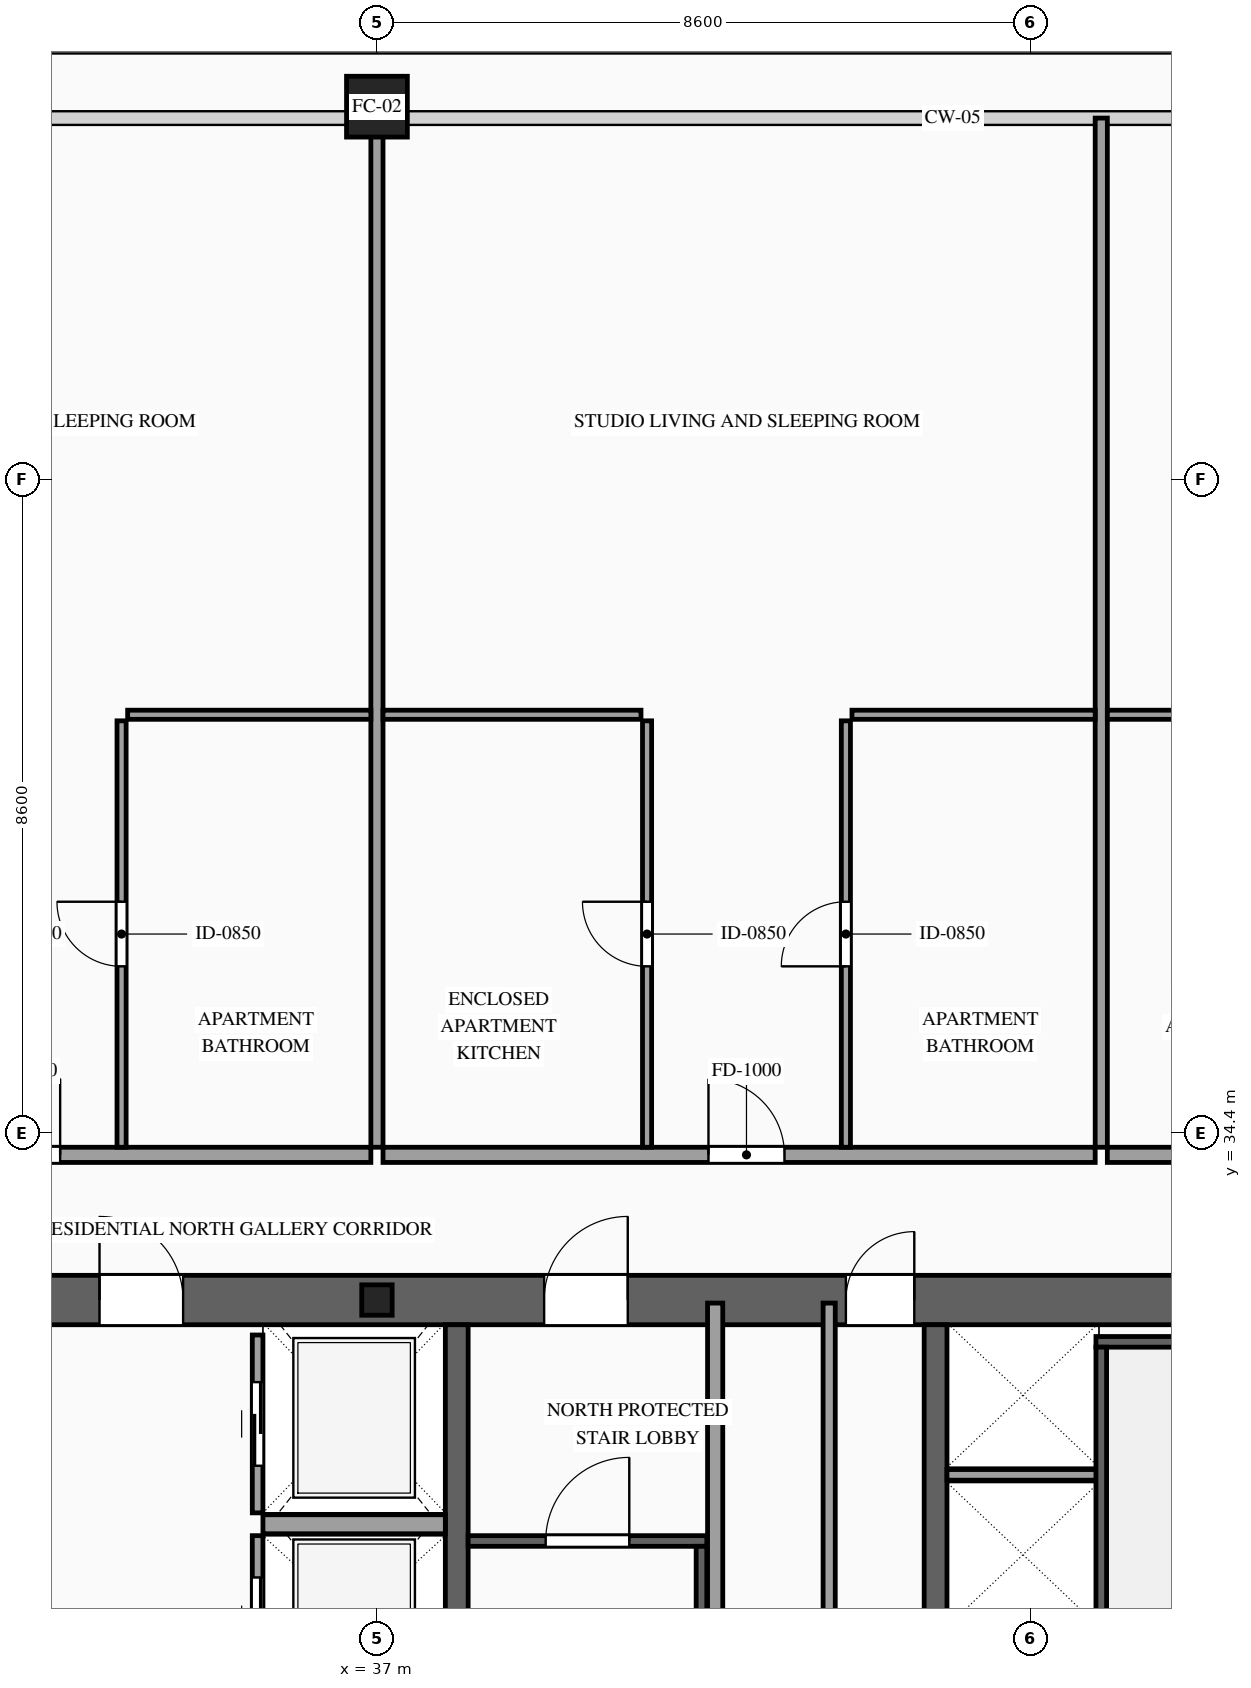
"""IFC4 building model, lengths in metres.
Left out: names, types, materials, properties, quantities, classifications, styles, units other than length and angle.
Written with IfcOpenShell. Run it as: python <this file> out.ifc"""

import sys

from ifc_helpers import new_model, si_unit, direction, frame, frame_2d, origin, origin_2d, place, context, subcontext, project, spatial, rectangle, hollow_rectangle, i_section, extrude, source, transform, mapped, element, fill, save


model = new_model("IFC4")
c1 = context("Model", 3, precision=1e-05, world=origin(), true_north=direction((0.0, 1.0)))
c2 = subcontext(c1, "Body", "Model", "MODEL_VIEW")
j1 = project(units=[si_unit("LENGTHUNIT", "METRE"), si_unit("PLANEANGLEUNIT", "RADIAN")], contexts=[c1])
p1 = place(None, origin())
s1 = spatial("IfcSite", under=j1, at=p1, CompositionType="ELEMENT")
p2 = place(p1, origin())
s2 = spatial("IfcBuilding", under=s1, at=p2, CompositionType="ELEMENT")
p3 = place(p2, frame((0.0, 0.0, 184.5)))
s3 = spatial("IfcBuildingStorey", under=s2, at=p3, CompositionType="ELEMENT", Elevation=184.5)
p4 = place(p3, frame((23.475, 32.2, 0.0), z_axis=(0.0, 0.0, 1.0), x_axis=(1.0, 0.0, 0.0)))
e1 = element("IfcWall", 1, at=p4, inside=s3, PredefinedType="SHEAR", context=c2, shape_type="SweptSolid", body=[
    extrude(rectangle(XDim=27.05, YDim=0.65, at=frame_2d((13.525, 0.0))), origin(), (0.0, 0.0, 1.0), 3.5),
])
p5 = place(p4, frame((4.595, 0.0, 0.0)))
e2 = element("IfcOpeningElement", 2, at=p5, cuts=e1, PredefinedType="OPENING", context=c2, shape_type="SweptSolid", body=[
    extrude(rectangle(XDim=0.9, YDim=2.15, at=frame_2d((0.45, 1.075))), frame((0.0, 0.34, 0.0), z_axis=(0.0, -1.0, 0.0), x_axis=(1.0, 0.0, 0.0)), (0.0, 0.0, 1.0), 0.68),
])
p6 = place(p4, frame((9.875, 0.0, 0.0)))
e3 = element("IfcOpeningElement", 3, at=p6, cuts=e1, PredefinedType="OPENING", context=c2, shape_type="SweptSolid", body=[
    extrude(rectangle(XDim=1.1, YDim=2.2, at=frame_2d((0.55, 1.1))), frame((0.0, 0.34, 0.0), z_axis=(0.0, -1.0, 0.0), x_axis=(1.0, 0.0, 0.0)), (0.0, 0.0, 1.0), 0.68),
])
p7 = place(p4, frame((15.725, 0.0, 0.0)))
e4 = element("IfcOpeningElement", 4, at=p7, cuts=e1, PredefinedType="OPENING", context=c2, shape_type="SweptSolid", body=[
    extrude(rectangle(XDim=1.1, YDim=2.2, at=frame_2d((0.55, 1.1))), frame((0.0, 0.34, 0.0), z_axis=(0.0, -1.0, 0.0), x_axis=(1.0, 0.0, 0.0)), (0.0, 0.0, 1.0), 0.68),
])
p8 = place(p4, frame((19.695, 0.0, 0.0)))
e5 = element("IfcOpeningElement", 5, at=p8, cuts=e1, PredefinedType="OPENING", context=c2, shape_type="SweptSolid", body=[
    extrude(rectangle(XDim=0.9, YDim=2.15, at=frame_2d((0.45, 1.075))), frame((0.0, 0.34, 0.0), z_axis=(0.0, -1.0, 0.0), x_axis=(1.0, 0.0, 0.0)), (0.0, 0.0, 1.0), 0.68),
])
m1 = source(origin(), c2, "Body", "SweptSolid", [
    extrude(rectangle(XDim=12.15, YDim=0.3, at=frame_2d((6.075, 0.0))), origin(), (0.0, 0.0, 1.0), 3.5),
])
for number, where, z_axis, x_axis in (
    (6, (38.05, 19.725, 0.0), (0.0, 0.0, 1.0), (0.0, 1.0, 0.0)),
    (7, (44.35, 19.725, 0.0), (0.0, 0.0, 1.0), (0.0, 1.0, 0.0)),
):
    element("IfcWall", number, at=place(p3, frame(where, z_axis=z_axis, x_axis=x_axis)), inside=s3, PredefinedType="SOLIDWALL", context=c2, shape_type="MappedRepresentation", body=[
        mapped(m1, transform((0.0, 0.0, 0.0), scale=1.0)),
    ])
m2 = source(origin(), c2, "Body", "SweptSolid", [
    extrude(i_section(OverallWidth=0.4, OverallDepth=0.4, WebThickness=0.013, FlangeThickness=0.021, at=origin_2d()), origin(), (0.0, 0.0, 1.0), 3.5),
])
p9 = place(p3, frame((37.0, 32.2, 0.0), z_axis=(0.0, 0.0, 1.0), x_axis=(1.0, 0.0, 0.0)))
e8 = element("IfcColumn", 8, at=p9, inside=s3, PredefinedType="COLUMN", context=c2, shape_type="MappedRepresentation", body=[
    mapped(m2, transform((0.0, 0.0, 0.0), scale=1.0)),
])
m3 = source(origin(), c2, "Body", "SweptSolid", [
    extrude(hollow_rectangle(XDim=0.8, YDim=0.8, WallThickness=0.036, at=origin_2d()), origin(), (0.0, 0.0, 1.0), 3.5),
])
p10 = place(p3, frame((37.0, 47.9, 0.0), z_axis=(0.0, 0.0, 1.0), x_axis=(1.0, 0.0, 0.0)))
e9 = element("IfcColumn", 9, at=p10, inside=s3, PredefinedType="COLUMN", context=c2, shape_type="MappedRepresentation", body=[
    mapped(m3, transform((0.0, 0.0, 0.0), scale=1.0)),
])
p11 = place(p3, frame((35.43, 26.9, 0.0), z_axis=(0.0, 0.0, 1.0), x_axis=(0.0, 1.0, 0.0)))
e10 = element("IfcWall", 10, at=p11, inside=s3, PredefinedType="SOLIDWALL", context=c2, shape_type="SweptSolid", body=[
    extrude(rectangle(XDim=2.2, YDim=0.14, at=frame_2d((1.1, 0.0))), origin(), (0.0, 0.0, 1.0), 3.28),
])
p12 = place(p11, frame((0.55, 0.0, 0.0)))
e11 = element("IfcOpeningElement", 11, at=p12, cuts=e10, PredefinedType="OPENING", context=c2, shape_type="SweptSolid", body=[
    extrude(rectangle(XDim=1.1, YDim=2.2, at=frame_2d((0.55, 1.1))), frame((0.0, 0.085, 0.0), z_axis=(0.0, -1.0, 0.0), x_axis=(1.0, 0.0, 0.0)), (0.0, 0.0, 1.0), 0.17),
])
p13 = place(p3, frame((35.43, 29.4, 0.0), z_axis=(0.0, 0.0, 1.0), x_axis=(0.0, 1.0, 0.0)))
e12 = element("IfcWall", 12, at=p13, inside=s3, PredefinedType="SOLIDWALL", context=c2, shape_type="SweptSolid", body=[
    extrude(rectangle(XDim=2.34, YDim=0.14, at=frame_2d((1.17, 0.0))), origin(), (0.0, 0.0, 1.0), 3.28),
])
p14 = place(p13, frame((0.62, 0.0, 0.0)))
e13 = element("IfcOpeningElement", 13, at=p14, cuts=e12, PredefinedType="OPENING", context=c2, shape_type="SweptSolid", body=[
    extrude(rectangle(XDim=1.1, YDim=2.2, at=frame_2d((0.55, 1.1))), frame((0.0, 0.085, 0.0), z_axis=(0.0, -1.0, 0.0), x_axis=(1.0, 0.0, 0.0)), (0.0, 0.0, 1.0), 0.17),
])
m4 = source(origin(), c2, "Body", "SweptSolid", [
    extrude(rectangle(XDim=2.4, YDim=0.25, at=frame_2d((1.2, 0.0))), origin(), (0.0, 0.0, 1.0), 3.28),
])
p15 = place(p3, frame((35.5, 29.25, 0.0), z_axis=(0.0, 0.0, 1.0), x_axis=(1.0, 0.0, 0.0)))
e14 = element("IfcWall", 14, at=p15, inside=s3, PredefinedType="SOLIDWALL", context=c2, shape_type="MappedRepresentation", body=[
    mapped(m4, transform((0.0, 0.0, 0.0), scale=1.0)),
])
m5 = source(origin(), c2, "Body", "SweptSolid", [
    extrude(rectangle(XDim=2.0, YDim=0.14, at=frame_2d((1.0, 0.0))), origin(), (0.0, 0.0, 1.0), 3.28),
])
p16 = place(p3, frame((44.5, 29.9, 0.0), z_axis=(0.0, 0.0, 1.0), x_axis=(1.0, 0.0, 0.0)))
e15 = element("IfcWall", 15, at=p16, inside=s3, PredefinedType="SOLIDWALL", context=c2, shape_type="MappedRepresentation", body=[
    mapped(m5, transform((0.0, 0.0, 0.0), scale=1.0)),
])
m6 = source(origin(), c2, "Body", "SweptSolid", [
    extrude(rectangle(XDim=3.28, YDim=0.14, at=frame_2d((1.64, 0.0))), origin(), (0.0, 0.0, 1.0), 3.28),
])
p17 = place(p3, frame((46.46, 31.65, 0.0), z_axis=(0.0, 0.0, 1.0), x_axis=(1.0, 0.0, 0.0)))
e16 = element("IfcWall", 16, at=p17, inside=s3, PredefinedType="SOLIDWALL", context=c2, shape_type="MappedRepresentation", body=[
    mapped(m6, transform((0.0, 0.0, 0.0), scale=1.0)),
])
m7 = source(origin(), c2, "Body", "SweptSolid", [
    extrude(rectangle(XDim=8.94, YDim=0.14, at=frame_2d((4.47, 0.0))), origin(), (0.0, 0.0, 1.0), 3.28),
])
p18 = place(p3, frame((46.53, 22.64, 0.0), z_axis=(0.0, 0.0, 1.0), x_axis=(0.0, 1.0, 0.0)))
e17 = element("IfcWall", 17, at=p18, inside=s3, PredefinedType="SOLIDWALL", context=c2, shape_type="MappedRepresentation", body=[
    mapped(m7, transform((0.0, 0.0, 0.0), scale=1.0)),
])
p19 = place(p3, frame((38.2, 29.03, 0.0), z_axis=(0.0, 0.0, 1.0), x_axis=(1.0, 0.0, 0.0)))
e18 = element("IfcWall", 18, at=p19, inside=s3, PredefinedType="SOLIDWALL", context=c2, shape_type="SweptSolid", body=[
    extrude(rectangle(XDim=3.14, YDim=0.14, at=frame_2d((1.57, 0.0))), origin(), (0.0, 0.0, 1.0), 3.28),
])
p20 = place(p19, frame((1.02, 0.0, 0.0)))
e19 = element("IfcOpeningElement", 19, at=p20, cuts=e18, PredefinedType="OPENING", context=c2, shape_type="SweptSolid", body=[
    extrude(rectangle(XDim=1.1, YDim=2.2, at=frame_2d((0.55, 1.1))), frame((0.0, 0.085, 0.0), z_axis=(0.0, -1.0, 0.0), x_axis=(1.0, 0.0, 0.0)), (0.0, 0.0, 1.0), 0.17),
])
m8 = source(origin(), c2, "Body", "SweptSolid", [
    extrude(rectangle(XDim=8.94, YDim=0.14, at=frame_2d((4.47, 0.0))), origin(), (0.0, 0.0, 1.0), 3.28),
])
p21 = place(p3, frame((41.27, 20.02, 0.0), z_axis=(0.0, 0.0, 1.0), x_axis=(0.0, 1.0, 0.0)))
e20 = element("IfcWall", 20, at=p21, inside=s3, PredefinedType="SOLIDWALL", context=c2, shape_type="MappedRepresentation", body=[
    mapped(m8, transform((0.0, 0.0, 0.0), scale=1.0)),
])
m9 = source(origin(), c2, "Body", "SweptSolid", [
    extrude(rectangle(XDim=12.72, YDim=0.2, at=frame_2d((6.36, 0.0))), origin(), (0.0, 0.0, 1.0), 3.28),
])
p22 = place(p3, frame((41.45, 19.44, 0.0), z_axis=(0.0, 0.0, 1.0), x_axis=(0.0, 1.0, 0.0)))
e21 = element("IfcWall", 21, at=p22, inside=s3, PredefinedType="PARTITIONING", context=c2, shape_type="MappedRepresentation", body=[
    mapped(m9, transform((0.0, 0.0, 0.0), scale=1.0)),
])
m10 = source(origin(), c2, "Body", "SweptSolid", [
    extrude(rectangle(XDim=10.72, YDim=0.16, at=frame_2d((5.36, 0.0))), origin(), (0.0, 0.0, 1.0), 3.28),
])
p23 = place(p3, frame((42.95, 21.44, 0.0), z_axis=(0.0, 0.0, 1.0), x_axis=(0.0, 1.0, 0.0)))
e22 = element("IfcWall", 22, at=p23, inside=s3, PredefinedType="PARTITIONING", context=c2, shape_type="MappedRepresentation", body=[
    mapped(m10, transform((0.0, 0.0, 0.0), scale=1.0)),
])
p24 = place(p3, frame((27.55, 34.11, 0.0), z_axis=(0.0, 0.0, 1.0), x_axis=(1.0, 0.0, 0.0)))
e23 = element("IfcWall", 23, at=p24, inside=s3, PredefinedType="PARTITIONING", context=c2, shape_type="SweptSolid", body=[
    extrude(rectangle(XDim=9.37, YDim=0.2, at=frame_2d((4.685, 0.0))), origin(), (0.0, 0.0, 1.0), 3.28),
])
p25 = place(p24, frame((4.282, 0.0, 0.0)))
e24 = element("IfcOpeningElement", 24, at=p25, cuts=e23, PredefinedType="OPENING", context=c2, shape_type="SweptSolid", body=[
    extrude(rectangle(XDim=1.0, YDim=2.2, at=frame_2d((0.5, 1.1))), frame((0.0, 0.115, 0.0), z_axis=(0.0, -1.0, 0.0), x_axis=(1.0, 0.0, 0.0)), (0.0, 0.0, 1.0), 0.23),
])
m11 = source(origin(), c2, "Body", "SweptSolid", [
    extrude(rectangle(XDim=13.54, YDim=0.16, at=frame_2d((6.77, 0.0))), origin(), (0.0, 0.0, 1.0), 2.687),
])
p26 = place(p3, frame((37.0, 34.21, 0.0), z_axis=(0.0, 0.0, 1.0), x_axis=(0.0, 1.0, 0.0)))
e25 = element("IfcWall", 25, at=p26, inside=s3, PredefinedType="PARTITIONING", context=c2, shape_type="MappedRepresentation", body=[
    mapped(m11, transform((0.0, 0.0, 0.0), scale=1.0)),
])
m12 = source(origin(), c2, "Body", "SweptSolid", [
    extrude(rectangle(XDim=3.2, YDim=0.12, at=frame_2d((1.6, 0.0))), origin(), (0.0, 0.0, 1.0), 2.875),
])
p27 = place(p3, frame((33.72, 39.9, 0.0), z_axis=(0.0, 0.0, 1.0), x_axis=(1.0, 0.0, 0.0)))
e26 = element("IfcWall", 26, at=p27, inside=s3, PredefinedType="PARTITIONING", context=c2, shape_type="MappedRepresentation", body=[
    mapped(m12, transform((0.0, 0.0, 0.0), scale=1.0)),
])
p28 = place(p3, frame((33.64, 34.21, 0.0), z_axis=(0.0, 0.0, 1.0), x_axis=(0.0, 1.0, 0.0)))
e27 = element("IfcWall", 27, at=p28, inside=s3, PredefinedType="PARTITIONING", context=c2, shape_type="SweptSolid", body=[
    extrude(rectangle(XDim=5.61, YDim=0.12, at=frame_2d((2.805, 0.0))), origin(), (0.0, 0.0, 1.0), 3.28),
])
p29 = place(p28, frame((2.38, 0.0, 0.0)))
e28 = element("IfcOpeningElement", 28, at=p29, cuts=e27, PredefinedType="OPENING", context=c2, shape_type="SweptSolid", body=[
    extrude(rectangle(XDim=0.85, YDim=2.1, at=frame_2d((0.425, 1.05))), frame((0.0, 0.075, 0.0), z_axis=(0.0, -1.0, 0.0), x_axis=(1.0, 0.0, 0.0)), (0.0, 0.0, 1.0), 0.15),
])
p30 = place(p3, frame((37.08, 34.11, 0.0), z_axis=(0.0, 0.0, 1.0), x_axis=(1.0, 0.0, 0.0)))
e29 = element("IfcWall", 29, at=p30, inside=s3, PredefinedType="PARTITIONING", context=c2, shape_type="SweptSolid", body=[
    extrude(rectangle(XDim=9.37, YDim=0.2, at=frame_2d((4.685, 0.0))), origin(), (0.0, 0.0, 1.0), 3.28),
])
p31 = place(p30, frame((4.282, 0.0, 0.0)))
e30 = element("IfcOpeningElement", 30, at=p31, cuts=e29, PredefinedType="OPENING", context=c2, shape_type="SweptSolid", body=[
    extrude(rectangle(XDim=1.0, YDim=2.2, at=frame_2d((0.5, 1.1))), frame((0.0, 0.115, 0.0), z_axis=(0.0, -1.0, 0.0), x_axis=(1.0, 0.0, 0.0)), (0.0, 0.0, 1.0), 0.23),
])
m13 = source(origin(), c2, "Body", "SweptSolid", [
    extrude(rectangle(XDim=13.54, YDim=0.16, at=frame_2d((6.77, 0.0))), origin(), (0.0, 0.0, 1.0), 3.28),
])
p32 = place(p3, frame((46.53, 34.21, 0.0), z_axis=(0.0, 0.0, 1.0), x_axis=(0.0, 1.0, 0.0)))
e31 = element("IfcWall", 31, at=p32, inside=s3, PredefinedType="PARTITIONING", context=c2, shape_type="MappedRepresentation", body=[
    mapped(m13, transform((0.0, 0.0, 0.0), scale=1.0)),
])
m14 = source(origin(), c2, "Body", "SweptSolid", [
    extrude(rectangle(XDim=3.394, YDim=0.12, at=frame_2d((1.697, 0.0))), origin(), (0.0, 0.0, 1.0), 2.875),
])
p33 = place(p3, frame((37.08, 39.9, 0.0), z_axis=(0.0, 0.0, 1.0), x_axis=(1.0, 0.0, 0.0)))
e32 = element("IfcWall", 32, at=p33, inside=s3, PredefinedType="PARTITIONING", context=c2, shape_type="MappedRepresentation", body=[
    mapped(m14, transform((0.0, 0.0, 0.0), scale=1.0)),
])
p34 = place(p3, frame((40.554, 34.21, 0.0), z_axis=(0.0, 0.0, 1.0), x_axis=(0.0, 1.0, 0.0)))
e33 = element("IfcWall", 33, at=p34, inside=s3, PredefinedType="PARTITIONING", context=c2, shape_type="SweptSolid", body=[
    extrude(rectangle(XDim=5.61, YDim=0.12, at=frame_2d((2.805, 0.0))), origin(), (0.0, 0.0, 1.0), 3.28),
])
p35 = place(p34, frame((2.38, 0.0, 0.0)))
e34 = element("IfcOpeningElement", 34, at=p35, cuts=e33, PredefinedType="OPENING", context=c2, shape_type="SweptSolid", body=[
    extrude(rectangle(XDim=0.85, YDim=2.1, at=frame_2d((0.425, 1.05))), frame((0.0, 0.075, 0.0), z_axis=(0.0, -1.0, 0.0), x_axis=(1.0, 0.0, 0.0)), (0.0, 0.0, 1.0), 0.15),
])
p36 = place(p3, frame((43.25, 39.9, 0.0), z_axis=(0.0, 0.0, 1.0), x_axis=(1.0, 0.0, 0.0)))
e35 = element("IfcWall", 35, at=p36, inside=s3, PredefinedType="PARTITIONING", context=c2, shape_type="MappedRepresentation", body=[
    mapped(m12, transform((0.0, 0.0, 0.0), scale=1.0)),
])
p37 = place(p3, frame((43.17, 34.21, 0.0), z_axis=(0.0, 0.0, 1.0), x_axis=(0.0, 1.0, 0.0)))
e36 = element("IfcWall", 36, at=p37, inside=s3, PredefinedType="PARTITIONING", context=c2, shape_type="SweptSolid", body=[
    extrude(rectangle(XDim=5.61, YDim=0.12, at=frame_2d((2.805, 0.0))), origin(), (0.0, 0.0, 1.0), 3.28),
])
p38 = place(p37, frame((2.38, 0.0, 0.0)))
e37 = element("IfcOpeningElement", 37, at=p38, cuts=e36, PredefinedType="OPENING", context=c2, shape_type="SweptSolid", body=[
    extrude(rectangle(XDim=0.85, YDim=2.1, at=frame_2d((0.425, 1.05))), frame((0.0, 0.075, 0.0), z_axis=(0.0, -1.0, 0.0), x_axis=(1.0, 0.0, 0.0)), (0.0, 0.0, 1.0), 0.15),
])
p39 = place(p3, frame((46.61, 34.11, 0.0), z_axis=(0.0, 0.0, 1.0), x_axis=(1.0, 0.0, 0.0)))
e38 = element("IfcWall", 38, at=p39, inside=s3, PredefinedType="PARTITIONING", context=c2, shape_type="SweptSolid", body=[
    extrude(rectangle(XDim=9.45, YDim=0.2, at=frame_2d((4.725, 0.0))), origin(), (0.0, 0.0, 1.0), 3.28),
])
p40 = place(p39, frame((4.325, 0.0, 0.0)))
e39 = element("IfcOpeningElement", 39, at=p40, cuts=e38, PredefinedType="OPENING", context=c2, shape_type="SweptSolid", body=[
    extrude(rectangle(XDim=1.0, YDim=2.2, at=frame_2d((0.5, 1.1))), frame((0.0, 0.115, 0.0), z_axis=(0.0, -1.0, 0.0), x_axis=(1.0, 0.0, 0.0)), (0.0, 0.0, 1.0), 0.23),
])
m15 = source(origin(), c2, "Body", "SweptSolid", [
    extrude(rectangle(XDim=3.4, YDim=0.12, at=frame_2d((1.7, 0.0))), origin(), (0.0, 0.0, 1.0), 2.875),
])
p41 = place(p3, frame((46.61, 39.9, 0.0), z_axis=(0.0, 0.0, 1.0), x_axis=(1.0, 0.0, 0.0)))
e40 = element("IfcWall", 40, at=p41, inside=s3, PredefinedType="PARTITIONING", context=c2, shape_type="MappedRepresentation", body=[
    mapped(m15, transform((0.0, 0.0, 0.0), scale=1.0)),
])
m16 = source(origin(), c2, "Body", "SweptSolid", [
    extrude(rectangle(XDim=1.1, YDim=2.2, at=frame_2d((0.55, 1.1))), frame((0.0, 0.025, 0.0), z_axis=(0.0, -1.0, 0.0), x_axis=(1.0, 0.0, 0.0)), (0.0, 0.0, 1.0), 0.05),
])
p42 = place(p12, origin())
e41 = element("IfcDoor", 41, at=p42, inside=s3, OperationType="SLIDING_TO_LEFT", PredefinedType="DOOR", context=c2, shape_type="MappedRepresentation", body=[
    mapped(m16, transform((0.0, 0.0, 0.0), scale=1.0)),
])
fill(e11, e41)
p43 = place(p14, origin())
e42 = element("IfcDoor", 42, at=p43, inside=s3, OperationType="SLIDING_TO_RIGHT", PredefinedType="DOOR", context=c2, shape_type="MappedRepresentation", body=[
    mapped(m16, transform((0.0, 0.0, 0.0), scale=1.0)),
])
fill(e13, e42)
m17 = source(origin(), c2, "Body", "SweptSolid", [
    extrude(rectangle(XDim=1.1, YDim=2.2, at=frame_2d((0.55, 1.1))), frame((0.0, 0.025, 0.0), z_axis=(0.0, -1.0, 0.0), x_axis=(1.0, 0.0, 0.0)), (0.0, 0.0, 1.0), 0.05),
])
p44 = place(p20, origin())
e43 = element("IfcDoor", 43, at=p44, inside=s3, OperationType="SINGLE_SWING_RIGHT", PredefinedType="DOOR", context=c2, shape_type="MappedRepresentation", body=[
    mapped(m17, transform((0.0, 0.0, 0.0), scale=1.0)),
])
fill(e19, e43)
p45 = place(p6, origin())
e44 = element("IfcDoor", 44, at=p45, inside=s3, OperationType="SINGLE_SWING_LEFT", PredefinedType="DOOR", context=c2, shape_type="MappedRepresentation", body=[
    mapped(m17, transform((0.0, 0.0, 0.0), scale=1.0)),
])
fill(e3, e44)
p46 = place(p7, origin())
e45 = element("IfcDoor", 45, at=p46, inside=s3, OperationType="SINGLE_SWING_RIGHT", PredefinedType="DOOR", context=c2, shape_type="MappedRepresentation", body=[
    mapped(m17, transform((0.0, 0.0, 0.0), scale=1.0)),
])
fill(e4, e45)
m18 = source(origin(), c2, "Body", "SweptSolid", [
    extrude(rectangle(XDim=0.9, YDim=2.15, at=frame_2d((0.45, 1.075))), frame((0.0, 0.025, 0.0), z_axis=(0.0, -1.0, 0.0), x_axis=(1.0, 0.0, 0.0)), (0.0, 0.0, 1.0), 0.05),
])
p47 = place(p8, origin())
e46 = element("IfcDoor", 46, at=p47, inside=s3, OperationType="SINGLE_SWING_RIGHT", PredefinedType="DOOR", context=c2, shape_type="MappedRepresentation", body=[
    mapped(m18, transform((0.0, 0.0, 0.0), scale=1.0)),
])
fill(e5, e46)
m19 = source(origin(), c2, "Body", "SweptSolid", [
    extrude(rectangle(XDim=1.0, YDim=2.2, at=frame_2d((0.5, 1.1))), frame((0.0, 0.025, 0.0), z_axis=(0.0, -1.0, 0.0), x_axis=(1.0, 0.0, 0.0)), (0.0, 0.0, 1.0), 0.05),
])
p48 = place(p25, origin())
e47 = element("IfcDoor", 47, at=p48, inside=s3, OperationType="SINGLE_SWING_RIGHT", PredefinedType="DOOR", context=c2, shape_type="MappedRepresentation", body=[
    mapped(m19, transform((0.0, 0.0, 0.0), scale=1.0)),
])
fill(e24, e47)
m20 = source(origin(), c2, "Body", "SweptSolid", [
    extrude(rectangle(XDim=0.85, YDim=2.1, at=frame_2d((0.425, 1.05))), frame((0.0, 0.025, 0.0), z_axis=(0.0, -1.0, 0.0), x_axis=(1.0, 0.0, 0.0)), (0.0, 0.0, 1.0), 0.05),
])
p49 = place(p29, origin())
e48 = element("IfcDoor", 48, at=p49, inside=s3, OperationType="SINGLE_SWING_RIGHT", PredefinedType="DOOR", context=c2, shape_type="MappedRepresentation", body=[
    mapped(m20, transform((0.0, 0.0, 0.0), scale=1.0)),
])
fill(e28, e48)
p50 = place(p31, origin())
e49 = element("IfcDoor", 49, at=p50, inside=s3, OperationType="SINGLE_SWING_LEFT", PredefinedType="DOOR", context=c2, shape_type="MappedRepresentation", body=[
    mapped(m19, transform((0.0, 0.0, 0.0), scale=1.0)),
])
fill(e30, e49)
p51 = place(p35, origin())
e50 = element("IfcDoor", 50, at=p51, inside=s3, OperationType="SINGLE_SWING_RIGHT", PredefinedType="DOOR", context=c2, shape_type="MappedRepresentation", body=[
    mapped(m20, transform((0.0, 0.0, 0.0), scale=1.0)),
])
fill(e34, e50)
p52 = place(p38, origin())
e51 = element("IfcDoor", 51, at=p52, inside=s3, OperationType="SINGLE_SWING_LEFT", PredefinedType="DOOR", context=c2, shape_type="MappedRepresentation", body=[
    mapped(m20, transform((0.0, 0.0, 0.0), scale=1.0)),
])
fill(e37, e51)
save(model, sys.argv[1])
